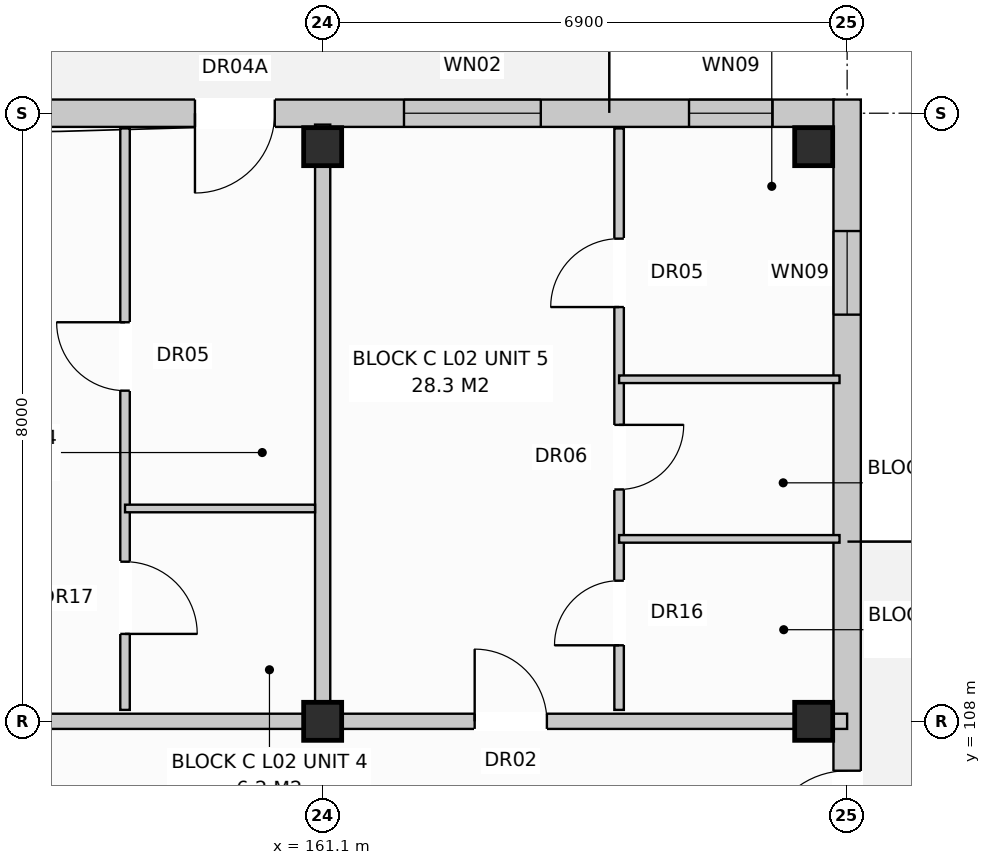
"""IFC4 building model, lengths in metres.
Left out: names, types, materials, properties, quantities, classifications, styles, units other than length and angle.
Written with IfcOpenShell. Run it as: python <this file> out.ifc"""

import sys

from ifc_helpers import new_model, si_unit, direction, frame, frame_2d, origin, origin_with_axes, origin_2d, place, context, subcontext, project, spatial, rectangle, extrude, element, fill, save


model = new_model("IFC4")
c1 = context("Model", 3, precision=1e-05, world=origin(), true_north=direction((0.0, 1.0)))
c2 = subcontext(c1, "Body", "Model", "MODEL_VIEW")
j1 = project(units=[si_unit("LENGTHUNIT", "METRE"), si_unit("PLANEANGLEUNIT", "RADIAN")], contexts=[c1])
p1 = place(None, origin())
s1 = spatial("IfcSite", under=j1, at=p1, CompositionType="ELEMENT")
p2 = place(p1, origin())
s2 = spatial("IfcBuilding", under=s1, at=p2, CompositionType="ELEMENT")
p3 = place(p2, frame((0.0, 0.0, 8.0)))
s3 = spatial("IfcBuildingStorey", under=s2, at=p3, CompositionType="ELEMENT", Elevation=8.0)
for number, where, z_axis, x_axis in (
    (1, (161.1, 108.0, 0.0), (0.0, 0.0, 1.0), (1.0, 0.0, 0.0)),
    (2, (161.1, 115.56, 0.0), (0.0, 0.0, 1.0), (1.0, 0.0, 0.0)),
    (3, (167.56, 108.0, 0.0), (0.0, 0.0, 1.0), (1.0, 0.0, 0.0)),
    (4, (167.56, 115.56, 0.0), (0.0, 0.0, 1.0), (1.0, 0.0, 0.0)),
):
    element("IfcColumn", number, at=place(p3, frame(where, z_axis=z_axis, x_axis=x_axis)), inside=s3, PredefinedType="COLUMN", context=c2, shape_type="SweptSolid", body=[
        extrude(rectangle(XDim=0.5, YDim=0.5, at=origin_2d()), origin(), (0.0, 0.0, 1.0), 3.2),
    ])
p4 = place(p3, frame((112.97, 116.0, 0.0), z_axis=(0.0, 0.0, 1.0), x_axis=(1.0, 0.0, 0.0)))
e5 = element("IfcWall", 5, at=p4, inside=s3, PredefinedType="STANDARD", context=c2, shape_type="SweptSolid", body=[
    extrude(rectangle(XDim=54.86, YDim=0.36, at=frame_2d((27.43, 0.0))), origin(), (0.0, 0.0, 1.0), 2.94),
])
p5 = place(p4, frame((4.876, 0.0, 0.0)))
e6 = element("IfcOpeningElement", 6, at=p5, cuts=e5, PredefinedType="OPENING", context=c2, shape_type="SweptSolid", body=[
    extrude(rectangle(XDim=1.05, YDim=2.12, at=frame_2d((0.525, 1.06))), frame((0.0, 0.192, 0.0), z_axis=(0.0, -1.0, 0.0), x_axis=(1.0, 0.0, 0.0)), (0.0, 0.0, 1.0), 0.384),
])
p6 = place(p4, frame((18.879, 0.0, 0.0)))
e7 = element("IfcOpeningElement", 7, at=p6, cuts=e5, PredefinedType="OPENING", context=c2, shape_type="SweptSolid", body=[
    extrude(rectangle(XDim=1.05, YDim=2.12, at=frame_2d((0.525, 1.06))), frame((0.0, 0.192, 0.0), z_axis=(0.0, -1.0, 0.0), x_axis=(1.0, 0.0, 0.0)), (0.0, 0.0, 1.0), 0.384),
])
p7 = place(p4, frame((31.379, 0.0, 0.0)))
e8 = element("IfcOpeningElement", 8, at=p7, cuts=e5, PredefinedType="OPENING", context=c2, shape_type="SweptSolid", body=[
    extrude(rectangle(XDim=1.05, YDim=2.12, at=frame_2d((0.525, 1.06))), frame((0.0, 0.192, 0.0), z_axis=(0.0, -1.0, 0.0), x_axis=(1.0, 0.0, 0.0)), (0.0, 0.0, 1.0), 0.384),
])
p8 = place(p4, frame((46.45, 0.0, 0.0)))
e9 = element("IfcOpeningElement", 9, at=p8, cuts=e5, PredefinedType="OPENING", context=c2, shape_type="SweptSolid", body=[
    extrude(rectangle(XDim=1.05, YDim=2.12, at=frame_2d((0.525, 1.06))), frame((0.0, 0.192, 0.0), z_axis=(0.0, -1.0, 0.0), x_axis=(1.0, 0.0, 0.0)), (0.0, 0.0, 1.0), 0.384),
])
p9 = place(p4, frame((2.45, 0.0, 0.72)))
e10 = element("IfcOpeningElement", 10, at=p9, cuts=e5, PredefinedType="OPENING", context=c2, shape_type="SweptSolid", body=[
    extrude(rectangle(XDim=1.1, YDim=1.5, at=frame_2d((0.55, 0.75))), frame((0.0, 0.192, 0.0), z_axis=(0.0, -1.0, 0.0), x_axis=(1.0, 0.0, 0.0)), (0.0, 0.0, 1.0), 0.384),
])
p10 = place(p4, frame((7.8, 0.0, 0.8)))
e11 = element("IfcOpeningElement", 11, at=p10, cuts=e5, PredefinedType="OPENING", context=c2, shape_type="SweptSolid", body=[
    extrude(rectangle(XDim=1.8, YDim=1.7, at=frame_2d((0.9, 0.85))), frame((0.0, 0.192, 0.0), z_axis=(0.0, -1.0, 0.0), x_axis=(1.0, 0.0, 0.0)), (0.0, 0.0, 1.0), 0.384),
])
p11 = place(p4, frame((14.55, 0.0, 0.72)))
e12 = element("IfcOpeningElement", 12, at=p11, cuts=e5, PredefinedType="OPENING", context=c2, shape_type="SweptSolid", body=[
    extrude(rectangle(XDim=1.1, YDim=1.5, at=frame_2d((0.55, 0.75))), frame((0.0, 0.192, 0.0), z_axis=(0.0, -1.0, 0.0), x_axis=(1.0, 0.0, 0.0)), (0.0, 0.0, 1.0), 0.384),
])
p12 = place(p4, frame((16.75, 0.0, 0.8)))
e13 = element("IfcOpeningElement", 13, at=p12, cuts=e5, PredefinedType="OPENING", context=c2, shape_type="SweptSolid", body=[
    extrude(rectangle(XDim=1.9, YDim=1.85, at=frame_2d((0.95, 0.925))), frame((0.0, 0.192, 0.0), z_axis=(0.0, -1.0, 0.0), x_axis=(1.0, 0.0, 0.0)), (0.0, 0.0, 1.0), 0.384),
])
p13 = place(p4, frame((21.6, 0.0, 0.8)))
e14 = element("IfcOpeningElement", 14, at=p13, cuts=e5, PredefinedType="OPENING", context=c2, shape_type="SweptSolid", body=[
    extrude(rectangle(XDim=1.8, YDim=1.7, at=frame_2d((0.9, 0.85))), frame((0.0, 0.192, 0.0), z_axis=(0.0, -1.0, 0.0), x_axis=(1.0, 0.0, 0.0)), (0.0, 0.0, 1.0), 0.384),
])
p14 = place(p4, frame((25.35, 0.0, 0.72)))
e15 = element("IfcOpeningElement", 15, at=p14, cuts=e5, PredefinedType="OPENING", context=c2, shape_type="SweptSolid", body=[
    extrude(rectangle(XDim=1.1, YDim=1.5, at=frame_2d((0.55, 0.75))), frame((0.0, 0.192, 0.0), z_axis=(0.0, -1.0, 0.0), x_axis=(1.0, 0.0, 0.0)), (0.0, 0.0, 1.0), 0.384),
])
p15 = place(p4, frame((29.55, 0.0, 0.72)))
e16 = element("IfcOpeningElement", 16, at=p15, cuts=e5, PredefinedType="OPENING", context=c2, shape_type="SweptSolid", body=[
    extrude(rectangle(XDim=1.1, YDim=1.5, at=frame_2d((0.55, 0.75))), frame((0.0, 0.192, 0.0), z_axis=(0.0, -1.0, 0.0), x_axis=(1.0, 0.0, 0.0)), (0.0, 0.0, 1.0), 0.384),
])
p16 = place(p4, frame((34.9, 0.0, 0.8)))
e17 = element("IfcOpeningElement", 17, at=p16, cuts=e5, PredefinedType="OPENING", context=c2, shape_type="SweptSolid", body=[
    extrude(rectangle(XDim=1.8, YDim=1.7, at=frame_2d((0.9, 0.85))), frame((0.0, 0.192, 0.0), z_axis=(0.0, -1.0, 0.0), x_axis=(1.0, 0.0, 0.0)), (0.0, 0.0, 1.0), 0.384),
])
p17 = place(p4, frame((38.45, 0.0, 0.72)))
e18 = element("IfcOpeningElement", 18, at=p17, cuts=e5, PredefinedType="OPENING", context=c2, shape_type="SweptSolid", body=[
    extrude(rectangle(XDim=1.1, YDim=1.5, at=frame_2d((0.55, 0.75))), frame((0.0, 0.192, 0.0), z_axis=(0.0, -1.0, 0.0), x_axis=(1.0, 0.0, 0.0)), (0.0, 0.0, 1.0), 0.384),
])
p18 = place(p4, frame((42.85, 0.0, 0.72)))
e19 = element("IfcOpeningElement", 19, at=p18, cuts=e5, PredefinedType="OPENING", context=c2, shape_type="SweptSolid", body=[
    extrude(rectangle(XDim=1.1, YDim=1.5, at=frame_2d((0.55, 0.75))), frame((0.0, 0.192, 0.0), z_axis=(0.0, -1.0, 0.0), x_axis=(1.0, 0.0, 0.0)), (0.0, 0.0, 1.0), 0.384),
])
p19 = place(p4, frame((49.2, 0.0, 0.8)))
e20 = element("IfcOpeningElement", 20, at=p19, cuts=e5, PredefinedType="OPENING", context=c2, shape_type="SweptSolid", body=[
    extrude(rectangle(XDim=1.8, YDim=1.7, at=frame_2d((0.9, 0.85))), frame((0.0, 0.192, 0.0), z_axis=(0.0, -1.0, 0.0), x_axis=(1.0, 0.0, 0.0)), (0.0, 0.0, 1.0), 0.384),
])
p20 = place(p4, frame((52.95, 0.0, 0.72)))
e21 = element("IfcOpeningElement", 21, at=p20, cuts=e5, PredefinedType="OPENING", context=c2, shape_type="SweptSolid", body=[
    extrude(rectangle(XDim=1.1, YDim=1.5, at=frame_2d((0.55, 0.75))), frame((0.0, 0.192, 0.0), z_axis=(0.0, -1.0, 0.0), x_axis=(1.0, 0.0, 0.0)), (0.0, 0.0, 1.0), 0.384),
])
p21 = place(p3, frame((168.0, 97.42, 0.0), z_axis=(0.0, 0.0, 1.0), x_axis=(0.0, 1.0, 0.0)))
e22 = element("IfcWall", 22, at=p21, inside=s3, PredefinedType="STANDARD", context=c2, shape_type="SweptSolid", body=[
    extrude(rectangle(XDim=18.76, YDim=0.36, at=frame_2d((9.38, 0.0))), origin(), (0.0, 0.0, 1.0), 2.94),
])
p22 = place(p21, frame((8.83, 0.0, 0.0)))
e23 = element("IfcOpeningElement", 23, at=p22, cuts=e22, PredefinedType="OPENING", context=c2, shape_type="SweptSolid", body=[
    extrude(rectangle(XDim=1.1, YDim=2.1, at=frame_2d((0.55, 1.05))), frame((0.0, 0.192, 0.0), z_axis=(0.0, -1.0, 0.0), x_axis=(1.0, 0.0, 0.0)), (0.0, 0.0, 1.0), 0.384),
])
p23 = place(p21, frame((1.73, 0.0, 0.72)))
e24 = element("IfcOpeningElement", 24, at=p23, cuts=e22, PredefinedType="OPENING", context=c2, shape_type="SweptSolid", body=[
    extrude(rectangle(XDim=1.1, YDim=1.5, at=frame_2d((0.55, 0.75))), frame((0.0, 0.192, 0.0), z_axis=(0.0, -1.0, 0.0), x_axis=(1.0, 0.0, 0.0)), (0.0, 0.0, 1.0), 0.384),
])
p24 = place(p21, frame((15.93, 0.0, 0.72)))
e25 = element("IfcOpeningElement", 25, at=p24, cuts=e22, PredefinedType="OPENING", context=c2, shape_type="SweptSolid", body=[
    extrude(rectangle(XDim=1.1, YDim=1.5, at=frame_2d((0.55, 0.75))), frame((0.0, 0.192, 0.0), z_axis=(0.0, -1.0, 0.0), x_axis=(1.0, 0.0, 0.0)), (0.0, 0.0, 1.0), 0.384),
])
p25 = place(p3, frame((161.1, 108.15, 0.0), z_axis=(0.0, 0.0, 1.0), x_axis=(0.0, 1.0, 0.0)))
e26 = element("IfcWall", 26, at=p25, inside=s3, PredefinedType="PARTITIONING", context=c2, shape_type="SweptSolid", body=[
    extrude(rectangle(XDim=7.7, YDim=0.2, at=frame_2d((3.85, 0.0))), origin(), (0.0, 0.0, 1.0), 2.38),
])
p26 = place(p3, frame((154.2, 108.0, 0.0), z_axis=(0.0, 0.0, 1.0), x_axis=(1.0, 0.0, 0.0)))
e27 = element("IfcWall", 27, at=p26, inside=s3, PredefinedType="PARTITIONING", context=c2, shape_type="SweptSolid", body=[
    extrude(rectangle(XDim=6.9, YDim=0.2, at=frame_2d((3.45, 0.0))), origin(), (0.0, 0.0, 1.0), 2.38),
])
p27 = place(p26, frame((2.0, 0.0, 0.0)))
e28 = element("IfcOpeningElement", 28, at=p27, cuts=e27, PredefinedType="OPENING", context=c2, shape_type="SweptSolid", body=[
    extrude(rectangle(XDim=0.95, YDim=2.15, at=frame_2d((0.475, 1.075))), frame((0.0, 0.112, 0.0), z_axis=(0.0, -1.0, 0.0), x_axis=(1.0, 0.0, 0.0)), (0.0, 0.0, 1.0), 0.224),
])
p28 = place(p3, frame((158.5, 108.15, 0.0), z_axis=(0.0, 0.0, 1.0), x_axis=(0.0, 1.0, 0.0)))
e29 = element("IfcWall", 29, at=p28, inside=s3, PredefinedType="PARTITIONING", context=c2, shape_type="SweptSolid", body=[
    extrude(rectangle(XDim=7.65, YDim=0.125, at=frame_2d((3.825, 0.0))), origin(), (0.0, 0.0, 1.0), 2.94),
])
p29 = place(p28, frame((1.0, 0.0, 0.0)))
e30 = element("IfcOpeningElement", 30, at=p29, cuts=e29, PredefinedType="OPENING", context=c2, shape_type="SweptSolid", body=[
    extrude(rectangle(XDim=0.95, YDim=2.1, at=frame_2d((0.475, 1.05))), frame((0.0, 0.074, 0.0), z_axis=(0.0, -1.0, 0.0), x_axis=(1.0, 0.0, 0.0)), (0.0, 0.0, 1.0), 0.149),
])
p30 = place(p28, frame((4.2, 0.0, 0.0)))
e31 = element("IfcOpeningElement", 31, at=p30, cuts=e29, PredefinedType="OPENING", context=c2, shape_type="SweptSolid", body=[
    extrude(rectangle(XDim=0.9, YDim=2.1, at=frame_2d((0.45, 1.05))), frame((0.0, 0.074, 0.0), z_axis=(0.0, -1.0, 0.0), x_axis=(1.0, 0.0, 0.0)), (0.0, 0.0, 1.0), 0.149),
])
p31 = place(p3, frame((158.5, 110.8, 0.0), z_axis=(0.0, 0.0, 1.0), x_axis=(1.0, 0.0, 0.0)))
e32 = element("IfcWall", 32, at=p31, inside=s3, PredefinedType="PARTITIONING", context=c2, shape_type="SweptSolid", body=[
    extrude(rectangle(XDim=2.5, YDim=0.1, at=frame_2d((1.25, 0.0))), origin(), (0.0, 0.0, 1.0), 2.94),
])
p32 = place(p3, frame((161.1, 108.0, 0.0), z_axis=(0.0, 0.0, 1.0), x_axis=(1.0, 0.0, 0.0)))
e33 = element("IfcWall", 33, at=p32, inside=s3, PredefinedType="PARTITIONING", context=c2, shape_type="SweptSolid", body=[
    extrude(rectangle(XDim=6.9, YDim=0.2, at=frame_2d((3.45, 0.0))), origin(), (0.0, 0.0, 1.0), 2.38),
])
p33 = place(p32, frame((2.0, 0.0, 0.0)))
e34 = element("IfcOpeningElement", 34, at=p33, cuts=e33, PredefinedType="OPENING", context=c2, shape_type="SweptSolid", body=[
    extrude(rectangle(XDim=0.95, YDim=2.15, at=frame_2d((0.475, 1.075))), frame((0.0, 0.112, 0.0), z_axis=(0.0, -1.0, 0.0), x_axis=(1.0, 0.0, 0.0)), (0.0, 0.0, 1.0), 0.224),
])
p34 = place(p3, frame((165.0, 108.15, 0.0), z_axis=(0.0, 0.0, 1.0), x_axis=(0.0, 1.0, 0.0)))
e35 = element("IfcWall", 35, at=p34, inside=s3, PredefinedType="PARTITIONING", context=c2, shape_type="SweptSolid", body=[
    extrude(rectangle(XDim=7.65, YDim=0.125, at=frame_2d((3.825, 0.0))), origin(), (0.0, 0.0, 1.0), 2.94),
])
p35 = place(p34, frame((0.85, 0.0, 0.0)))
e36 = element("IfcOpeningElement", 36, at=p35, cuts=e35, PredefinedType="OPENING", context=c2, shape_type="SweptSolid", body=[
    extrude(rectangle(XDim=0.85, YDim=2.1, at=frame_2d((0.425, 1.05))), frame((0.0, 0.074, 0.0), z_axis=(0.0, -1.0, 0.0), x_axis=(1.0, 0.0, 0.0)), (0.0, 0.0, 1.0), 0.149),
])
p36 = place(p34, frame((2.9, 0.0, 0.0)))
e37 = element("IfcOpeningElement", 37, at=p36, cuts=e35, PredefinedType="OPENING", context=c2, shape_type="SweptSolid", body=[
    extrude(rectangle(XDim=0.85, YDim=2.05, at=frame_2d((0.425, 1.025))), frame((0.0, 0.074, 0.0), z_axis=(0.0, -1.0, 0.0), x_axis=(1.0, 0.0, 0.0)), (0.0, 0.0, 1.0), 0.149),
])
p37 = place(p34, frame((5.3, 0.0, 0.0)))
e38 = element("IfcOpeningElement", 38, at=p37, cuts=e35, PredefinedType="OPENING", context=c2, shape_type="SweptSolid", body=[
    extrude(rectangle(XDim=0.9, YDim=2.1, at=frame_2d((0.45, 1.05))), frame((0.0, 0.074, 0.0), z_axis=(0.0, -1.0, 0.0), x_axis=(1.0, 0.0, 0.0)), (0.0, 0.0, 1.0), 0.149),
])
for number, where, z_axis, x_axis in (
    (39, (165.0, 110.4, 0.0), (0.0, 0.0, 1.0), (1.0, 0.0, 0.0)),
    (40, (165.0, 112.5, 0.0), (0.0, 0.0, 1.0), (1.0, 0.0, 0.0)),
):
    element("IfcWall", number, at=place(p3, frame(where, z_axis=z_axis, x_axis=x_axis)), inside=s3, PredefinedType="PARTITIONING", context=c2, shape_type="SweptSolid", body=[
        extrude(rectangle(XDim=2.9, YDim=0.1, at=frame_2d((1.45, 0.0))), origin(), (0.0, 0.0, 1.0), 2.94),
    ])
p38 = place(p8, frame((1.05, 0.0, 0.0), z_axis=(0.0, 0.0, 1.0), x_axis=(-1.0, 0.0, 0.0)))
e41 = element("IfcDoor", 41, at=p38, inside=s3, OperationType="SINGLE_SWING_LEFT", PredefinedType="DOOR", context=c2, shape_type="SweptSolid", body=[
    extrude(rectangle(XDim=1.05, YDim=2.12, at=frame_2d((0.525, 1.06))), frame((0.0, 0.025, 0.0), z_axis=(0.0, -1.0, 0.0), x_axis=(1.0, 0.0, 0.0)), (0.0, 0.0, 1.0), 0.05),
])
fill(e9, e41)
p39 = place(p19, origin_with_axes())
e42 = element("IfcWindow", 42, at=p39, inside=s3, PartitioningType="SINGLE_PANEL", PredefinedType="WINDOW", context=c2, shape_type="SweptSolid", body=[
    extrude(rectangle(XDim=1.8, YDim=1.7, at=frame_2d((0.9, 0.85))), frame((0.0, 0.03, 0.0), z_axis=(0.0, -1.0, 0.0), x_axis=(1.0, 0.0, 0.0)), (0.0, 0.0, 1.0), 0.06),
])
fill(e20, e42)
p40 = place(p20, origin_with_axes())
e43 = element("IfcWindow", 43, at=p40, inside=s3, PartitioningType="SINGLE_PANEL", PredefinedType="WINDOW", context=c2, shape_type="SweptSolid", body=[
    extrude(rectangle(XDim=1.1, YDim=1.5, at=frame_2d((0.55, 0.75))), frame((0.0, 0.03, 0.0), z_axis=(0.0, -1.0, 0.0), x_axis=(1.0, 0.0, 0.0)), (0.0, 0.0, 1.0), 0.06),
])
fill(e21, e43)
p41 = place(p22, origin_with_axes())
e44 = element("IfcDoor", 44, at=p41, inside=s3, OperationType="SINGLE_SWING_LEFT", PredefinedType="DOOR", context=c2, shape_type="SweptSolid", body=[
    extrude(rectangle(XDim=1.1, YDim=2.1, at=frame_2d((0.55, 1.05))), frame((0.0, 0.025, 0.0), z_axis=(0.0, -1.0, 0.0), x_axis=(1.0, 0.0, 0.0)), (0.0, 0.0, 1.0), 0.05),
])
fill(e23, e44)
p42 = place(p24, origin_with_axes())
e45 = element("IfcWindow", 45, at=p42, inside=s3, PartitioningType="SINGLE_PANEL", PredefinedType="WINDOW", context=c2, shape_type="SweptSolid", body=[
    extrude(rectangle(XDim=1.1, YDim=1.5, at=frame_2d((0.55, 0.75))), frame((0.0, 0.03, 0.0), z_axis=(0.0, -1.0, 0.0), x_axis=(1.0, 0.0, 0.0)), (0.0, 0.0, 1.0), 0.06),
])
fill(e25, e45)
p43 = place(p29, frame((0.95, 0.0, 0.0), z_axis=(0.0, 0.0, 1.0), x_axis=(-1.0, 0.0, 0.0)))
e46 = element("IfcDoor", 46, at=p43, inside=s3, OperationType="SINGLE_SWING_LEFT", PredefinedType="DOOR", context=c2, shape_type="SweptSolid", body=[
    extrude(rectangle(XDim=0.95, YDim=2.1, at=frame_2d((0.475, 1.05))), frame((0.0, 0.025, 0.0), z_axis=(0.0, -1.0, 0.0), x_axis=(1.0, 0.0, 0.0)), (0.0, 0.0, 1.0), 0.05),
])
fill(e30, e46)
p44 = place(p30, origin_with_axes())
e47 = element("IfcDoor", 47, at=p44, inside=s3, OperationType="SINGLE_SWING_RIGHT", PredefinedType="DOOR", context=c2, shape_type="SweptSolid", body=[
    extrude(rectangle(XDim=0.9, YDim=2.1, at=frame_2d((0.45, 1.05))), frame((0.0, 0.025, 0.0), z_axis=(0.0, -1.0, 0.0), x_axis=(1.0, 0.0, 0.0)), (0.0, 0.0, 1.0), 0.05),
])
fill(e31, e47)
p45 = place(p33, origin_with_axes())
e48 = element("IfcDoor", 48, at=p45, inside=s3, OperationType="SINGLE_SWING_LEFT", PredefinedType="DOOR", context=c2, shape_type="SweptSolid", body=[
    extrude(rectangle(XDim=0.95, YDim=2.15, at=frame_2d((0.475, 1.075))), frame((0.0, 0.025, 0.0), z_axis=(0.0, -1.0, 0.0), x_axis=(1.0, 0.0, 0.0)), (0.0, 0.0, 1.0), 0.05),
])
fill(e34, e48)
p46 = place(p35, origin_with_axes())
e49 = element("IfcDoor", 49, at=p46, inside=s3, OperationType="SINGLE_SWING_LEFT", PredefinedType="DOOR", context=c2, shape_type="SweptSolid", body=[
    extrude(rectangle(XDim=0.85, YDim=2.1, at=frame_2d((0.425, 1.05))), frame((0.0, 0.025, 0.0), z_axis=(0.0, -1.0, 0.0), x_axis=(1.0, 0.0, 0.0)), (0.0, 0.0, 1.0), 0.05),
])
fill(e36, e49)
p47 = place(p36, frame((0.85, 0.0, 0.0), z_axis=(0.0, 0.0, 1.0), x_axis=(-1.0, 0.0, 0.0)))
e50 = element("IfcDoor", 50, at=p47, inside=s3, OperationType="SINGLE_SWING_RIGHT", PredefinedType="DOOR", context=c2, shape_type="SweptSolid", body=[
    extrude(rectangle(XDim=0.85, YDim=2.05, at=frame_2d((0.425, 1.025))), frame((0.0, 0.025, 0.0), z_axis=(0.0, -1.0, 0.0), x_axis=(1.0, 0.0, 0.0)), (0.0, 0.0, 1.0), 0.05),
])
fill(e37, e50)
p48 = place(p37, origin_with_axes())
e51 = element("IfcDoor", 51, at=p48, inside=s3, OperationType="SINGLE_SWING_LEFT", PredefinedType="DOOR", context=c2, shape_type="SweptSolid", body=[
    extrude(rectangle(XDim=0.9, YDim=2.1, at=frame_2d((0.45, 1.05))), frame((0.0, 0.025, 0.0), z_axis=(0.0, -1.0, 0.0), x_axis=(1.0, 0.0, 0.0)), (0.0, 0.0, 1.0), 0.05),
])
fill(e38, e51)
save(model, sys.argv[1])
